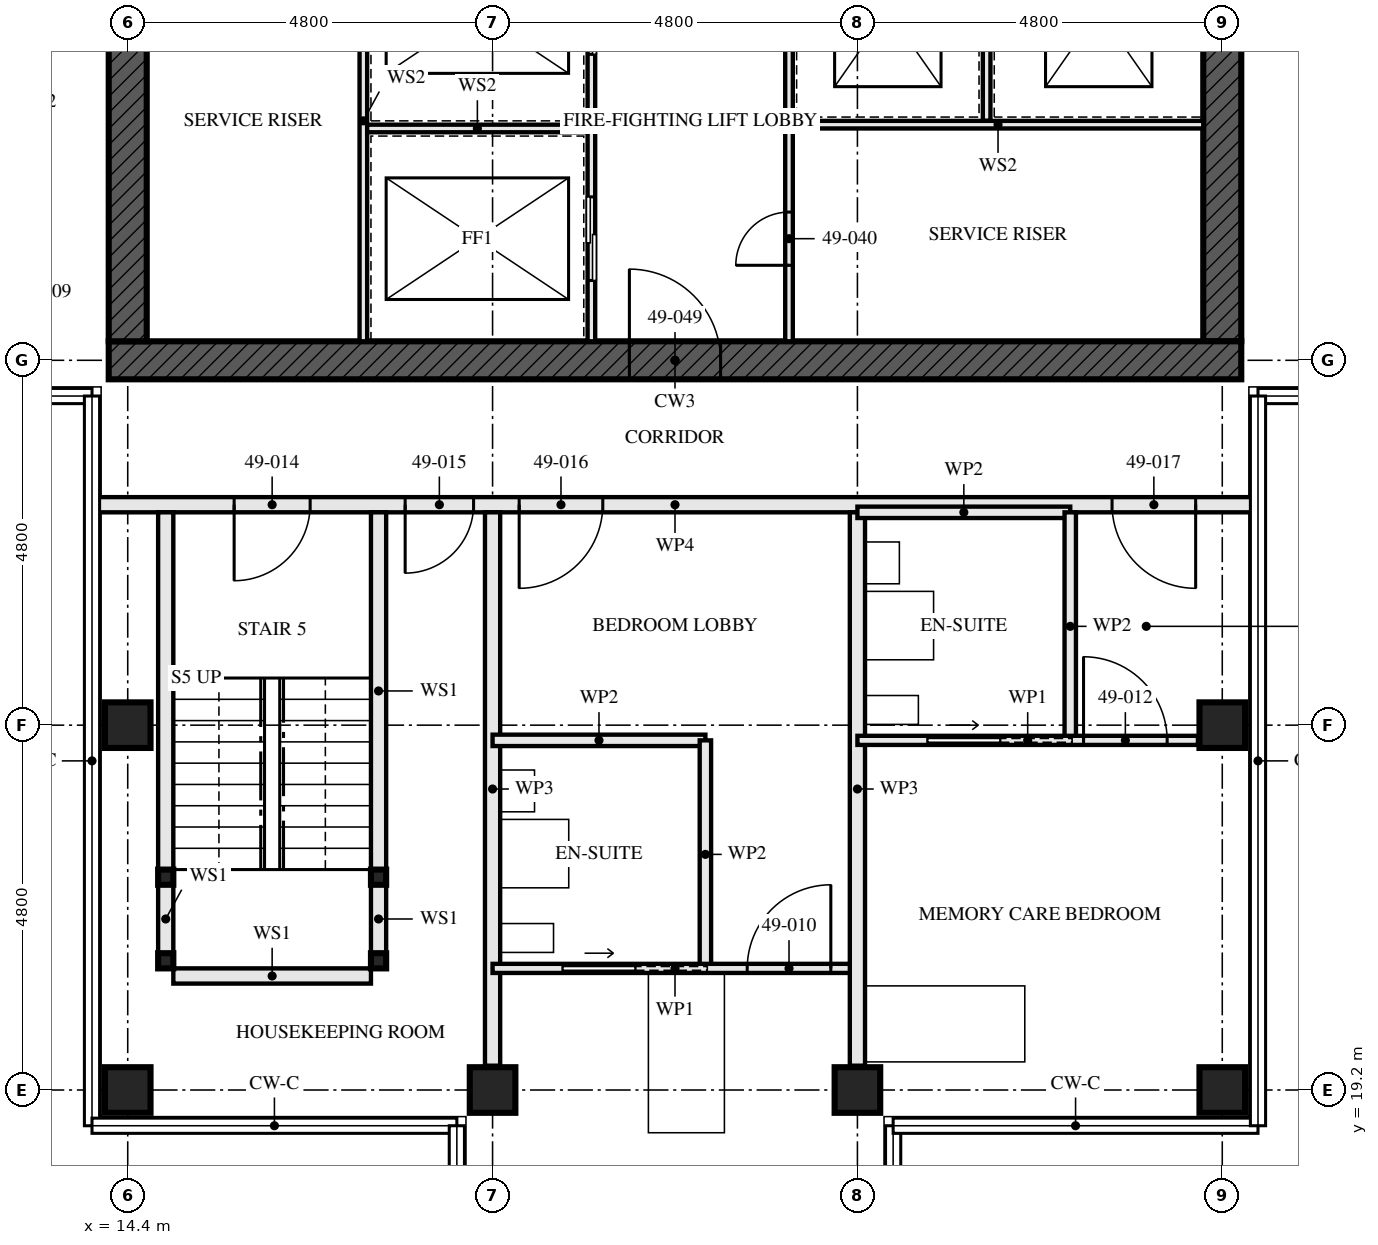
"""IFC4 building model, lengths in metres.
Left out: names, types, materials, properties, quantities, classifications, styles, units other than length and angle.
Written with IfcOpenShell. Run it as: python <this file> out.ifc"""

import sys

from ifc_helpers import new_model, si_unit, direction, frame, frame_2d, origin, origin_2d, place, context, subcontext, project, spatial, rectangle, hollow_rectangle, extrude, element, fill, save


model = new_model("IFC4")
c1 = context("Model", 3, precision=1e-05, world=origin(), true_north=direction((0.0, 1.0)))
c2 = subcontext(c1, "Body", "Model", "MODEL_VIEW")
j1 = project(units=[si_unit("LENGTHUNIT", "METRE"), si_unit("PLANEANGLEUNIT", "RADIAN")], contexts=[c1])
p1 = place(None, origin())
s1 = spatial("IfcSite", under=j1, at=p1, CompositionType="ELEMENT")
p2 = place(p1, origin())
s2 = spatial("IfcBuilding", under=s1, at=p2, CompositionType="ELEMENT")
p3 = place(p2, frame((0.0, 0.0, 179.5)))
s3 = spatial("IfcBuildingStorey", under=s2, at=p3, CompositionType="ELEMENT", Elevation=179.5)
for number, where, z_axis, x_axis in (
    (1, (14.4, 19.2, 0.0), (0.0, 0.0, 1.0), (0.0, 1.0, 0.0)),
    (2, (14.4, 24.0, 0.0), (0.0, 0.0, 1.0), (1.0, 0.0, 0.0)),
    (3, (19.2, 19.2, 0.0), (0.0, 0.0, 1.0), (0.0, 1.0, 0.0)),
    (4, (24.0, 19.2, 0.0), (0.0, 0.0, 1.0), (0.0, 1.0, 0.0)),
    (5, (28.8, 19.2, 0.0), (0.0, 0.0, 1.0), (0.0, 1.0, 0.0)),
    (6, (28.8, 24.0, 0.0), (0.0, 0.0, 1.0), (1.0, 0.0, 0.0)),
):
    element("IfcColumn", number, at=place(p3, frame(where, z_axis=z_axis, x_axis=x_axis)), inside=s3, PredefinedType="COLUMN", context=c2, shape_type="SweptSolid", body=[
        extrude(hollow_rectangle(XDim=0.6, YDim=0.6, WallThickness=0.08, at=origin_2d()), origin(), (0.0, 0.0, 1.0), 3.5),
    ])
p4 = place(p3, frame((14.15, 28.8, -0.17), z_axis=(0.0, 0.0, 1.0), x_axis=(1.0, 0.0, 0.0)))
e7 = element("IfcWall", 7, at=p4, inside=s3, PredefinedType="SHEAR", context=c2, shape_type="SweptSolid", body=[
    extrude(rectangle(XDim=14.9, YDim=0.5, at=frame_2d((7.45, 0.0))), origin(), (0.0, 0.0, 1.0), 3.5),
])
p5 = place(p4, frame((6.85, 0.0, 0.17)))
e8 = element("IfcOpeningElement", 8, at=p5, cuts=e7, PredefinedType="OPENING", context=c2, shape_type="SweptSolid", body=[
    extrude(rectangle(XDim=1.2, YDim=2.1, at=frame_2d((0.6, 1.05))), frame((0.0, 0.26, 0.0), z_axis=(0.0, -1.0, 0.0), x_axis=(1.0, 0.0, 0.0)), (0.0, 0.0, 1.0), 0.521),
])
p6 = place(p3, frame((14.4, 42.95, -0.17), z_axis=(0.0, 0.0, 1.0), x_axis=(0.0, -1.0, 0.0)))
e9 = element("IfcWall", 9, at=p6, inside=s3, PredefinedType="SHEAR", context=c2, shape_type="SweptSolid", body=[
    extrude(rectangle(XDim=13.9, YDim=0.5, at=frame_2d((6.95, 0.0))), origin(), (0.0, 0.0, 1.0), 3.5),
])
p7 = place(p6, frame((6.35, 0.0, 0.17)))
e10 = element("IfcOpeningElement", 10, at=p7, cuts=e9, PredefinedType="OPENING", context=c2, shape_type="SweptSolid", body=[
    extrude(rectangle(XDim=1.2, YDim=2.1, at=frame_2d((0.6, 1.05))), frame((0.0, 0.26, 0.0), z_axis=(0.0, -1.0, 0.0), x_axis=(1.0, 0.0, 0.0)), (0.0, 0.0, 1.0), 0.521),
])
p8 = place(p3, frame((28.8, 29.05, -0.17), z_axis=(0.0, 0.0, 1.0), x_axis=(0.0, 1.0, 0.0)))
e11 = element("IfcWall", 11, at=p8, inside=s3, PredefinedType="SHEAR", context=c2, shape_type="SweptSolid", body=[
    extrude(rectangle(XDim=13.9, YDim=0.5, at=frame_2d((6.95, 0.0))), origin(), (0.0, 0.0, 1.0), 3.5),
])
p9 = place(p8, frame((6.35, 0.0, 0.17)))
e12 = element("IfcOpeningElement", 12, at=p9, cuts=e11, PredefinedType="OPENING", context=c2, shape_type="SweptSolid", body=[
    extrude(rectangle(XDim=1.2, YDim=2.1, at=frame_2d((0.6, 1.05))), frame((0.0, 0.26, 0.0), z_axis=(0.0, -1.0, 0.0), x_axis=(1.0, 0.0, 0.0)), (0.0, 0.0, 1.0), 0.521),
])
for number, where, z_axis, x_axis in (
    (13, (14.9, 20.9, 0.0), (0.0, 0.0, 1.0), (1.0, 0.0, 0.0)),
    (14, (17.7, 20.9, 0.0), (0.0, 0.0, 1.0), (1.0, 0.0, 0.0)),
    (15, (14.9, 22.0, 0.0), (0.0, 0.0, 1.0), (1.0, 0.0, 0.0)),
    (16, (17.7, 22.0, 0.0), (0.0, 0.0, 1.0), (1.0, 0.0, 0.0)),
):
    element("IfcColumn", number, at=place(p3, frame(where, z_axis=z_axis, x_axis=x_axis)), inside=s3, PredefinedType="COLUMN", context=c2, shape_type="SweptSolid", body=[
        extrude(hollow_rectangle(XDim=0.2, YDim=0.2, WallThickness=0.008, at=origin_2d()), origin(), (0.0, 0.0, 1.0), 3.33),
    ])
p10 = place(p3, frame((14.9, 21.0, 0.0), z_axis=(0.0, 0.0, 1.0), x_axis=(0.0, 1.0, 0.0)))
e17 = element("IfcWall", 17, at=p10, inside=s3, PredefinedType="SOLIDWALL", context=c2, shape_type="SweptSolid", body=[
    extrude(rectangle(XDim=0.9, YDim=0.2, at=frame_2d((0.45, 0.0))), origin(), (0.0, 0.0, 1.0), 2.99),
])
p11 = place(p3, frame((14.9, 22.1, 0.0), z_axis=(0.0, 0.0, 1.0), x_axis=(0.0, 1.0, 0.0)))
e18 = element("IfcWall", 18, at=p11, inside=s3, PredefinedType="SOLIDWALL", context=c2, shape_type="SweptSolid", body=[
    extrude(rectangle(XDim=4.7, YDim=0.2, at=frame_2d((2.35, 0.0))), origin(), (0.0, 0.0, 1.0), 2.99),
])
p12 = place(p3, frame((17.7, 21.0, 0.0), z_axis=(0.0, 0.0, 1.0), x_axis=(0.0, 1.0, 0.0)))
e19 = element("IfcWall", 19, at=p12, inside=s3, PredefinedType="SOLIDWALL", context=c2, shape_type="SweptSolid", body=[
    extrude(rectangle(XDim=0.9, YDim=0.2, at=frame_2d((0.45, 0.0))), origin(), (0.0, 0.0, 1.0), 2.99),
])
p13 = place(p3, frame((17.7, 22.1, 0.0), z_axis=(0.0, 0.0, 1.0), x_axis=(0.0, 1.0, 0.0)))
e20 = element("IfcWall", 20, at=p13, inside=s3, PredefinedType="SOLIDWALL", context=c2, shape_type="SweptSolid", body=[
    extrude(rectangle(XDim=4.7, YDim=0.2, at=frame_2d((2.35, 0.0))), origin(), (0.0, 0.0, 1.0), 2.99),
])
p14 = place(p3, frame((15.0, 20.7, 0.0), z_axis=(0.0, 0.0, 1.0), x_axis=(1.0, 0.0, 0.0)))
e21 = element("IfcWall", 21, at=p14, inside=s3, PredefinedType="SOLIDWALL", context=c2, shape_type="SweptSolid", body=[
    extrude(rectangle(XDim=2.6, YDim=0.2, at=frame_2d((1.3, 0.0))), origin(), (0.0, 0.0, 1.0), 3.33),
])
p15 = place(p3, frame((19.2, 19.52, 0.0), z_axis=(0.0, 0.0, 1.0), x_axis=(0.0, 1.0, 0.0)))
e22 = element("IfcWall", 22, at=p15, inside=s3, PredefinedType="PARTITIONING", context=c2, shape_type="SweptSolid", body=[
    extrude(rectangle(XDim=7.28, YDim=0.2, at=frame_2d((3.64, 0.0))), origin(), (0.0, 0.0, 1.0), 2.55),
])
p16 = place(p3, frame((22.0, 20.8, 0.0), z_axis=(0.0, 0.0, 1.0), x_axis=(0.0, 1.0, 0.0)))
e23 = element("IfcWall", 23, at=p16, inside=s3, PredefinedType="PARTITIONING", context=c2, shape_type="SweptSolid", body=[
    extrude(rectangle(XDim=3.0, YDim=0.15, at=frame_2d((1.5, 0.0))), origin(), (0.0, 0.0, 1.0), 3.33),
])
p17 = place(p3, frame((19.2, 23.8, 0.0), z_axis=(0.0, 0.0, 1.0), x_axis=(1.0, 0.0, 0.0)))
e24 = element("IfcWall", 24, at=p17, inside=s3, PredefinedType="PARTITIONING", context=c2, shape_type="SweptSolid", body=[
    extrude(rectangle(XDim=2.8, YDim=0.15, at=frame_2d((1.4, 0.0))), origin(), (0.0, 0.0, 1.0), 3.33),
])
p18 = place(p3, frame((19.2, 20.8, 0.0), z_axis=(0.0, 0.0, 1.0), x_axis=(1.0, 0.0, 0.0)))
e25 = element("IfcWall", 25, at=p18, inside=s3, PredefinedType="PARTITIONING", context=c2, shape_type="SweptSolid", body=[
    extrude(rectangle(XDim=4.8, YDim=0.12, at=frame_2d((2.4, 0.0))), origin(), (0.0, 0.0, 1.0), 3.33),
])
p19 = place(p18, frame((3.35, 0.0, 0.0)))
e26 = element("IfcOpeningElement", 26, at=p19, cuts=e25, PredefinedType="OPENING", context=c2, shape_type="SweptSolid", body=[
    extrude(rectangle(XDim=1.1, YDim=2.1, at=frame_2d((0.55, 1.05))), frame((0.0, 0.071, 0.0), z_axis=(0.0, -1.0, 0.0), x_axis=(1.0, 0.0, 0.0)), (0.0, 0.0, 1.0), 0.141),
])
p20 = place(p18, frame((0.925, 0.0, 0.0)))
e27 = element("IfcOpeningElement", 27, at=p20, cuts=e25, PredefinedType="OPENING", context=c2, shape_type="SweptSolid", body=[
    extrude(rectangle(XDim=0.95, YDim=2.1, at=frame_2d((0.475, 1.05))), frame((0.0, 0.071, 0.0), z_axis=(0.0, -1.0, 0.0), x_axis=(1.0, 0.0, 0.0)), (0.0, 0.0, 1.0), 0.141),
])
p21 = place(p3, frame((24.0, 19.52, 0.0), z_axis=(0.0, 0.0, 1.0), x_axis=(0.0, 1.0, 0.0)))
e28 = element("IfcWall", 28, at=p21, inside=s3, PredefinedType="PARTITIONING", context=c2, shape_type="SweptSolid", body=[
    extrude(rectangle(XDim=7.28, YDim=0.2, at=frame_2d((3.64, 0.0))), origin(), (0.0, 0.0, 1.0), 2.55),
])
p22 = place(p3, frame((26.8, 23.8, 0.0), z_axis=(0.0, 0.0, 1.0), x_axis=(0.0, 1.0, 0.0)))
e29 = element("IfcWall", 29, at=p22, inside=s3, PredefinedType="PARTITIONING", context=c2, shape_type="SweptSolid", body=[
    extrude(rectangle(XDim=3.0, YDim=0.15, at=frame_2d((1.5, 0.0))), origin(), (0.0, 0.0, 1.0), 2.55),
])
p23 = place(p3, frame((24.0, 26.8, 0.0), z_axis=(0.0, 0.0, 1.0), x_axis=(1.0, 0.0, 0.0)))
e30 = element("IfcWall", 30, at=p23, inside=s3, PredefinedType="PARTITIONING", context=c2, shape_type="SweptSolid", body=[
    extrude(rectangle(XDim=2.8, YDim=0.15, at=frame_2d((1.4, 0.0))), origin(), (0.0, 0.0, 1.0), 3.33),
])
p24 = place(p3, frame((24.0, 23.8, 0.0), z_axis=(0.0, 0.0, 1.0), x_axis=(1.0, 0.0, 0.0)))
e31 = element("IfcWall", 31, at=p24, inside=s3, PredefinedType="PARTITIONING", context=c2, shape_type="SweptSolid", body=[
    extrude(rectangle(XDim=4.48, YDim=0.12, at=frame_2d((2.24, 0.0))), origin(), (0.0, 0.0, 1.0), 3.33),
])
p25 = place(p24, frame((2.975, 0.0, 0.0)))
e32 = element("IfcOpeningElement", 32, at=p25, cuts=e31, PredefinedType="OPENING", context=c2, shape_type="SweptSolid", body=[
    extrude(rectangle(XDim=1.1, YDim=2.1, at=frame_2d((0.55, 1.05))), frame((0.0, 0.071, 0.0), z_axis=(0.0, -1.0, 0.0), x_axis=(1.0, 0.0, 0.0)), (0.0, 0.0, 1.0), 0.141),
])
p26 = place(p24, frame((0.925, 0.0, 0.0)))
e33 = element("IfcOpeningElement", 33, at=p26, cuts=e31, PredefinedType="OPENING", context=c2, shape_type="SweptSolid", body=[
    extrude(rectangle(XDim=0.95, YDim=2.1, at=frame_2d((0.475, 1.05))), frame((0.0, 0.071, 0.0), z_axis=(0.0, -1.0, 0.0), x_axis=(1.0, 0.0, 0.0)), (0.0, 0.0, 1.0), 0.141),
])
p27 = place(p3, frame((13.95, 26.9, 0.0), z_axis=(0.0, 0.0, 1.0), x_axis=(1.0, 0.0, 0.0)))
e34 = element("IfcWall", 34, at=p27, inside=s3, PredefinedType="PARTITIONING", context=c2, shape_type="SweptSolid", body=[
    extrude(rectangle(XDim=15.3, YDim=0.2, at=frame_2d((7.65, 0.0))), origin(), (0.0, 0.0, 1.0), 2.32),
])
p28 = place(p27, frame((1.85, 0.0, 0.0)))
e35 = element("IfcOpeningElement", 35, at=p28, cuts=e34, PredefinedType="OPENING", context=c2, shape_type="SweptSolid", body=[
    extrude(rectangle(XDim=1.0, YDim=2.1, at=frame_2d((0.5, 1.05))), frame((0.0, 0.111, 0.0), z_axis=(0.0, -1.0, 0.0), x_axis=(1.0, 0.0, 0.0)), (0.0, 0.0, 1.0), 0.221),
])
p29 = place(p27, frame((4.1, 0.0, 0.0)))
e36 = element("IfcOpeningElement", 36, at=p29, cuts=e34, PredefinedType="OPENING", context=c2, shape_type="SweptSolid", body=[
    extrude(rectangle(XDim=0.9, YDim=2.1, at=frame_2d((0.45, 1.05))), frame((0.0, 0.111, 0.0), z_axis=(0.0, -1.0, 0.0), x_axis=(1.0, 0.0, 0.0)), (0.0, 0.0, 1.0), 0.221),
])
p30 = place(p27, frame((5.6, 0.0, 0.0)))
e37 = element("IfcOpeningElement", 37, at=p30, cuts=e34, PredefinedType="OPENING", context=c2, shape_type="SweptSolid", body=[
    extrude(rectangle(XDim=1.1, YDim=2.1, at=frame_2d((0.55, 1.05))), frame((0.0, 0.111, 0.0), z_axis=(0.0, -1.0, 0.0), x_axis=(1.0, 0.0, 0.0)), (0.0, 0.0, 1.0), 0.221),
])
p31 = place(p27, frame((13.4, 0.0, 0.0)))
e38 = element("IfcOpeningElement", 38, at=p31, cuts=e34, PredefinedType="OPENING", context=c2, shape_type="SweptSolid", body=[
    extrude(rectangle(XDim=1.1, YDim=2.1, at=frame_2d((0.55, 1.05))), frame((0.0, 0.111, 0.0), z_axis=(0.0, -1.0, 0.0), x_axis=(1.0, 0.0, 0.0)), (0.0, 0.0, 1.0), 0.221),
])
p32 = place(p3, frame((20.5, 29.05, 0.0), z_axis=(0.0, 0.0, 1.0), x_axis=(0.0, 1.0, 0.0)))
e39 = element("IfcWall", 39, at=p32, inside=s3, PredefinedType="SOLIDWALL", context=c2, shape_type="SweptSolid", body=[
    extrude(rectangle(XDim=5.8, YDim=0.1, at=frame_2d((2.9, 0.0))), origin(), (0.0, 0.0, 1.0), 3.33),
])
p33 = place(p32, frame((0.8, 0.0, 0.0)))
e40 = element("IfcOpeningElement", 40, at=p33, cuts=e39, PredefinedType="OPENING", context=c2, shape_type="SweptSolid", body=[
    extrude(rectangle(XDim=1.1, YDim=2.3, at=frame_2d((0.55, 1.15))), frame((0.0, 0.061, 0.0), z_axis=(0.0, -1.0, 0.0), x_axis=(1.0, 0.0, 0.0)), (0.0, 0.0, 1.0), 0.121),
])
p34 = place(p32, frame((3.775, 0.0, 0.0)))
e41 = element("IfcOpeningElement", 41, at=p34, cuts=e39, PredefinedType="OPENING", context=c2, shape_type="SweptSolid", body=[
    extrude(rectangle(XDim=1.1, YDim=2.3, at=frame_2d((0.55, 1.15))), frame((0.0, 0.061, 0.0), z_axis=(0.0, -1.0, 0.0), x_axis=(1.0, 0.0, 0.0)), (0.0, 0.0, 1.0), 0.121),
])
p35 = place(p3, frame((23.1, 29.05, 0.0), z_axis=(0.0, 0.0, 1.0), x_axis=(0.0, 1.0, 0.0)))
e42 = element("IfcWall", 42, at=p35, inside=s3, PredefinedType="SOLIDWALL", context=c2, shape_type="SweptSolid", body=[
    extrude(rectangle(XDim=5.8, YDim=0.1, at=frame_2d((2.9, 0.0))), origin(), (0.0, 0.0, 1.0), 3.33),
])
p36 = place(p35, frame((1.0, 0.0, 0.0)))
e43 = element("IfcOpeningElement", 43, at=p36, cuts=e42, PredefinedType="OPENING", context=c2, shape_type="SweptSolid", body=[
    extrude(rectangle(XDim=0.7, YDim=2.1, at=frame_2d((0.35, 1.05))), frame((0.0, 0.061, 0.0), z_axis=(0.0, -1.0, 0.0), x_axis=(1.0, 0.0, 0.0)), (0.0, 0.0, 1.0), 0.121),
])
p37 = place(p3, frame((17.5, 29.05, 0.0), z_axis=(0.0, 0.0, 1.0), x_axis=(0.0, 1.0, 0.0)))
e44 = element("IfcWall", 44, at=p37, inside=s3, PredefinedType="SOLIDWALL", context=c2, shape_type="SweptSolid", body=[
    extrude(rectangle(XDim=5.8, YDim=0.1, at=frame_2d((2.9, 0.0))), origin(), (0.0, 0.0, 1.0), 3.33),
])
p38 = place(p3, frame((17.55, 31.85, 0.0), z_axis=(0.0, 0.0, 1.0), x_axis=(1.0, 0.0, 0.0)))
e45 = element("IfcWall", 45, at=p38, inside=s3, PredefinedType="SOLIDWALL", context=c2, shape_type="SweptSolid", body=[
    extrude(rectangle(XDim=2.9, YDim=0.1, at=frame_2d((1.45, 0.0))), origin(), (0.0, 0.0, 1.0), 3.33),
])
p39 = place(p3, frame((25.7, 31.95, 0.0), z_axis=(0.0, 0.0, 1.0), x_axis=(0.0, 1.0, 0.0)))
e46 = element("IfcWall", 46, at=p39, inside=s3, PredefinedType="SOLIDWALL", context=c2, shape_type="SweptSolid", body=[
    extrude(rectangle(XDim=2.9, YDim=0.1, at=frame_2d((1.45, 0.0))), origin(), (0.0, 0.0, 1.0), 3.33),
])
p40 = place(p3, frame((23.15, 31.9, 0.0), z_axis=(0.0, 0.0, 1.0), x_axis=(1.0, 0.0, 0.0)))
e47 = element("IfcWall", 47, at=p40, inside=s3, PredefinedType="SOLIDWALL", context=c2, shape_type="SweptSolid", body=[
    extrude(rectangle(XDim=5.4, YDim=0.1, at=frame_2d((2.7, 0.0))), origin(), (0.0, 0.0, 1.0), 3.33),
])
p41 = place(p19, origin())
e48 = element("IfcDoor", 48, at=p41, inside=s3, OperationType="SINGLE_SWING_LEFT", PredefinedType="DOOR", context=c2, shape_type="SweptSolid", body=[
    extrude(rectangle(XDim=1.1, YDim=2.1, at=frame_2d((0.55, 1.05))), frame((0.0, 0.022, 0.0), z_axis=(0.0, -1.0, 0.0), x_axis=(1.0, 0.0, 0.0)), (0.0, 0.0, 1.0), 0.044),
])
fill(e26, e48)
p42 = place(p20, origin())
e49 = element("IfcDoor", 49, at=p42, inside=s3, OperationType="SLIDING_TO_LEFT", PredefinedType="DOOR", context=c2, shape_type="SweptSolid", body=[
    extrude(rectangle(XDim=0.95, YDim=2.1, at=frame_2d((0.475, 1.05))), frame((0.0, 0.022, 0.0), z_axis=(0.0, -1.0, 0.0), x_axis=(1.0, 0.0, 0.0)), (0.0, 0.0, 1.0), 0.044),
])
fill(e27, e49)
p43 = place(p25, origin())
e50 = element("IfcDoor", 50, at=p43, inside=s3, OperationType="SINGLE_SWING_RIGHT", PredefinedType="DOOR", context=c2, shape_type="SweptSolid", body=[
    extrude(rectangle(XDim=1.1, YDim=2.1, at=frame_2d((0.55, 1.05))), frame((0.0, 0.022, 0.0), z_axis=(0.0, -1.0, 0.0), x_axis=(1.0, 0.0, 0.0)), (0.0, 0.0, 1.0), 0.044),
])
fill(e32, e50)
p44 = place(p26, origin())
e51 = element("IfcDoor", 51, at=p44, inside=s3, OperationType="SLIDING_TO_LEFT", PredefinedType="DOOR", context=c2, shape_type="SweptSolid", body=[
    extrude(rectangle(XDim=0.95, YDim=2.1, at=frame_2d((0.475, 1.05))), frame((0.0, 0.022, 0.0), z_axis=(0.0, -1.0, 0.0), x_axis=(1.0, 0.0, 0.0)), (0.0, 0.0, 1.0), 0.044),
])
fill(e33, e51)
p45 = place(p28, frame((1.0, 0.0, 0.0), z_axis=(0.0, 0.0, 1.0), x_axis=(-1.0, 0.0, 0.0)))
e52 = element("IfcDoor", 52, at=p45, inside=s3, OperationType="SINGLE_SWING_LEFT", PredefinedType="DOOR", context=c2, shape_type="SweptSolid", body=[
    extrude(rectangle(XDim=1.0, YDim=2.1, at=frame_2d((0.5, 1.05))), frame((0.0, 0.032, 0.0), z_axis=(0.0, -1.0, 0.0), x_axis=(1.0, 0.0, 0.0)), (0.0, 0.0, 1.0), 0.064),
])
fill(e35, e52)
p46 = place(p29, frame((0.9, 0.0, 0.0), z_axis=(0.0, 0.0, 1.0), x_axis=(-1.0, 0.0, 0.0)))
e53 = element("IfcDoor", 53, at=p46, inside=s3, OperationType="SINGLE_SWING_LEFT", PredefinedType="DOOR", context=c2, shape_type="SweptSolid", body=[
    extrude(rectangle(XDim=0.9, YDim=2.1, at=frame_2d((0.45, 1.05))), frame((0.0, 0.027, 0.0), z_axis=(0.0, -1.0, 0.0), x_axis=(1.0, 0.0, 0.0)), (0.0, 0.0, 1.0), 0.054),
])
fill(e36, e53)
p47 = place(p30, frame((1.1, 0.0, 0.0), z_axis=(0.0, 0.0, 1.0), x_axis=(-1.0, 0.0, 0.0)))
e54 = element("IfcDoor", 54, at=p47, inside=s3, OperationType="SINGLE_SWING_LEFT", PredefinedType="DOOR", context=c2, shape_type="SweptSolid", body=[
    extrude(rectangle(XDim=1.1, YDim=2.1, at=frame_2d((0.55, 1.05))), frame((0.0, 0.027, 0.0), z_axis=(0.0, -1.0, 0.0), x_axis=(1.0, 0.0, 0.0)), (0.0, 0.0, 1.0), 0.054),
])
fill(e37, e54)
p48 = place(p31, frame((1.1, 0.0, 0.0), z_axis=(0.0, 0.0, 1.0), x_axis=(-1.0, 0.0, 0.0)))
e55 = element("IfcDoor", 55, at=p48, inside=s3, OperationType="SINGLE_SWING_RIGHT", PredefinedType="DOOR", context=c2, shape_type="SweptSolid", body=[
    extrude(rectangle(XDim=1.1, YDim=2.1, at=frame_2d((0.55, 1.05))), frame((0.0, 0.027, 0.0), z_axis=(0.0, -1.0, 0.0), x_axis=(1.0, 0.0, 0.0)), (0.0, 0.0, 1.0), 0.054),
])
fill(e38, e55)
p49 = place(p33, origin())
e56 = element("IfcDoor", 56, at=p49, inside=s3, OperationType="SLIDING_TO_LEFT", PredefinedType="DOOR", context=c2, shape_type="SweptSolid", body=[
    extrude(rectangle(XDim=1.1, YDim=2.3, at=frame_2d((0.55, 1.15))), frame((0.0, 0.05, 0.0), z_axis=(0.0, -1.0, 0.0), x_axis=(1.0, 0.0, 0.0)), (0.0, 0.0, 1.0), 0.1),
])
fill(e40, e56)
p50 = place(p34, origin())
e57 = element("IfcDoor", 57, at=p50, inside=s3, OperationType="SLIDING_TO_LEFT", PredefinedType="DOOR", context=c2, shape_type="SweptSolid", body=[
    extrude(rectangle(XDim=1.1, YDim=2.3, at=frame_2d((0.55, 1.15))), frame((0.0, 0.05, 0.0), z_axis=(0.0, -1.0, 0.0), x_axis=(1.0, 0.0, 0.0)), (0.0, 0.0, 1.0), 0.1),
])
fill(e41, e57)
p51 = place(p36, origin())
e58 = element("IfcDoor", 58, at=p51, inside=s3, OperationType="SINGLE_SWING_RIGHT", PredefinedType="DOOR", context=c2, shape_type="SweptSolid", body=[
    extrude(rectangle(XDim=0.7, YDim=2.1, at=frame_2d((0.35, 1.05))), frame((0.0, 0.027, 0.0), z_axis=(0.0, -1.0, 0.0), x_axis=(1.0, 0.0, 0.0)), (0.0, 0.0, 1.0), 0.054),
])
fill(e43, e58)
p52 = place(p5, origin())
e59 = element("IfcDoor", 59, at=p52, inside=s3, OperationType="SINGLE_SWING_LEFT", PredefinedType="DOOR", context=c2, shape_type="SweptSolid", body=[
    extrude(rectangle(XDim=1.2, YDim=2.1, at=frame_2d((0.6, 1.05))), frame((0.0, 0.027, 0.0), z_axis=(0.0, -1.0, 0.0), x_axis=(1.0, 0.0, 0.0)), (0.0, 0.0, 1.0), 0.054),
])
fill(e8, e59)
save(model, sys.argv[1])
